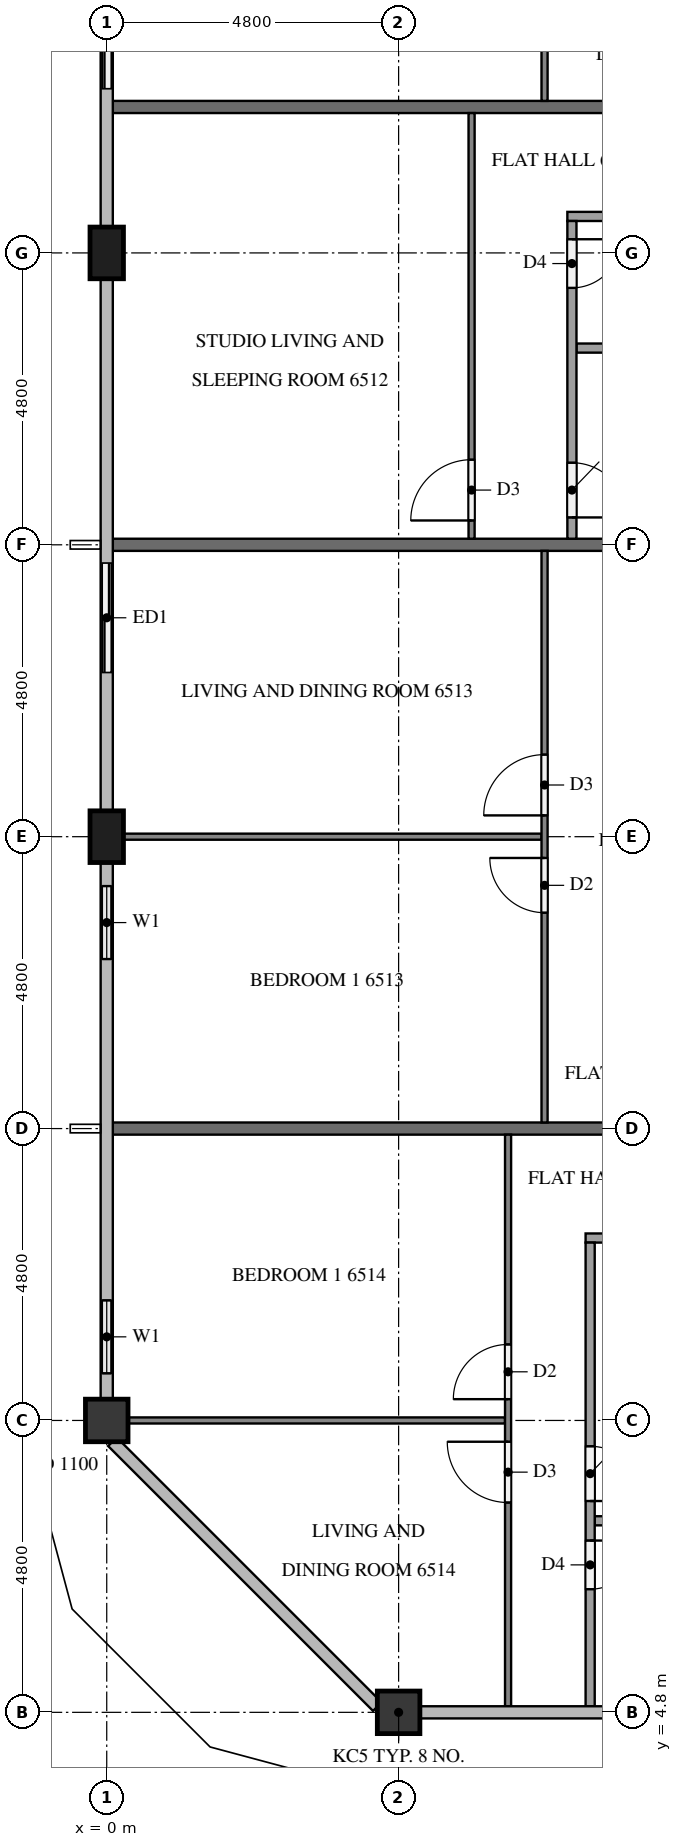
"""IFC4 building model, lengths in metres.
Left out: names, types, materials, properties, quantities, classifications, styles, units other than length and angle.
Written with IfcOpenShell. Run it as: python <this file> out.ifc"""

import sys

from ifc_helpers import new_model, si_unit, direction, frame, frame_2d, origin, origin_2d, place, context, subcontext, project, spatial, rectangle, extrude, element, fill, save


model = new_model("IFC4")
c1 = context("Model", 3, precision=1e-05, world=origin(), true_north=direction((0.0, 1.0)))
c2 = subcontext(c1, "Body", "Model", "MODEL_VIEW")
j1 = project(units=[si_unit("LENGTHUNIT", "METRE"), si_unit("PLANEANGLEUNIT", "RADIAN")], contexts=[c1])
p1 = place(None, origin())
s1 = spatial("IfcSite", under=j1, at=p1, CompositionType="ELEMENT")
p2 = place(p1, origin())
s2 = spatial("IfcBuilding", under=s1, at=p2, CompositionType="ELEMENT")
p3 = place(p2, frame((0.0, 0.0, 249.2)))
s3 = spatial("IfcBuildingStorey", under=s2, at=p3, CompositionType="ELEMENT", Elevation=249.2)
p4 = place(p3, frame((4.8, 4.8, 0.0), z_axis=(0.0, 0.0, 1.0), x_axis=(1.0, 0.0, 0.0)))
e1 = element("IfcColumn", 1, at=p4, inside=s3, PredefinedType="COLUMN", context=c2, shape_type="SweptSolid", body=[
    extrude(rectangle(XDim=0.7, YDim=0.7, at=origin_2d()), origin(), (0.0, 0.0, 1.0), 3.2),
])
for number, where, z_axis, x_axis in (
    (2, (0.0, 28.8, 0.0), (0.0, 0.0, 1.0), (0.0, 1.0, 0.0)),
    (3, (0.0, 19.2, 0.0), (0.0, 0.0, 1.0), (0.0, 1.0, 0.0)),
):
    element("IfcColumn", number, at=place(p3, frame(where, z_axis=z_axis, x_axis=x_axis)), inside=s3, PredefinedType="COLUMN", context=c2, shape_type="SweptSolid", body=[
        extrude(rectangle(XDim=0.85, YDim=0.55, at=origin_2d()), origin(), (0.0, 0.0, 1.0), 3.2),
    ])
p5 = place(p3, frame((0.0, 9.6, 0.0), z_axis=(0.0, 0.0, 1.0), x_axis=(1.0, 0.0, 0.0)))
e4 = element("IfcColumn", 4, at=p5, inside=s3, PredefinedType="COLUMN", context=c2, shape_type="SweptSolid", body=[
    extrude(rectangle(XDim=0.7, YDim=0.7, at=origin_2d()), origin(), (0.0, 0.0, 1.0), 3.2),
])
p6 = place(p3, frame((0.0, 33.6, 0.0), z_axis=(0.0, 0.0, 1.0), x_axis=(0.0, -1.0, 0.0)))
e5 = element("IfcWall", 5, at=p6, inside=s3, PredefinedType="SOLIDWALL", context=c2, shape_type="SweptSolid", body=[
    extrude(rectangle(XDim=2.4, YDim=0.15, at=frame_2d((1.2, 0.0))), origin(), (0.0, 0.0, 1.0), 3.2),
])
p7 = place(p6, frame((0.3, 0.0, 0.0)))
e6 = element("IfcOpeningElement", 6, at=p7, cuts=e5, PredefinedType="OPENING", context=c2, shape_type="SweptSolid", body=[
    extrude(rectangle(XDim=1.8, YDim=2.4, at=frame_2d((0.9, 1.2))), frame((0.0, 0.085, 0.0), z_axis=(0.0, -1.0, 0.0), x_axis=(1.0, 0.0, 0.0)), (0.0, 0.0, 1.0), 0.17),
])
p8 = place(p3, frame((0.0, 24.0, 0.0), z_axis=(0.0, 0.0, 1.0), x_axis=(0.0, -1.0, 0.0)))
e7 = element("IfcWall", 7, at=p8, inside=s3, PredefinedType="SOLIDWALL", context=c2, shape_type="SweptSolid", body=[
    extrude(rectangle(XDim=2.4, YDim=0.15, at=frame_2d((1.2, 0.0))), origin(), (0.0, 0.0, 1.0), 3.2),
])
p9 = place(p8, frame((0.3, 0.0, 0.0)))
e8 = element("IfcOpeningElement", 8, at=p9, cuts=e7, PredefinedType="OPENING", context=c2, shape_type="SweptSolid", body=[
    extrude(rectangle(XDim=1.8, YDim=2.4, at=frame_2d((0.9, 1.2))), frame((0.0, 0.085, 0.0), z_axis=(0.0, -1.0, 0.0), x_axis=(1.0, 0.0, 0.0)), (0.0, 0.0, 1.0), 0.17),
])
p10 = place(p3, frame((0.0, 18.775, 0.0), z_axis=(0.0, 0.0, 1.0), x_axis=(0.0, -1.0, 0.0)))
e9 = element("IfcWall", 9, at=p10, inside=s3, PredefinedType="SOLIDWALL", context=c2, shape_type="SweptSolid", body=[
    extrude(rectangle(XDim=1.975, YDim=0.15, at=frame_2d((0.987, 0.0))), origin(), (0.0, 0.0, 1.0), 3.2),
])
p11 = place(p10, frame((0.387, 0.0, 0.9)))
e10 = element("IfcOpeningElement", 10, at=p11, cuts=e9, PredefinedType="OPENING", context=c2, shape_type="SweptSolid", body=[
    extrude(rectangle(XDim=1.2, YDim=1.4, at=frame_2d((0.6, 0.7))), frame((0.0, 0.085, 0.0), z_axis=(0.0, -1.0, 0.0), x_axis=(1.0, 0.0, 0.0)), (0.0, 0.0, 1.0), 0.17),
])
p12 = place(p3, frame((0.0, 12.0, 0.0), z_axis=(0.0, 0.0, 1.0), x_axis=(0.0, -1.0, 0.0)))
e11 = element("IfcWall", 11, at=p12, inside=s3, PredefinedType="SOLIDWALL", context=c2, shape_type="SweptSolid", body=[
    extrude(rectangle(XDim=2.05, YDim=0.15, at=frame_2d((1.025, 0.0))), origin(), (0.0, 0.0, 1.0), 3.2),
])
p13 = place(p12, frame((0.425, 0.0, 0.9)))
e12 = element("IfcOpeningElement", 12, at=p13, cuts=e11, PredefinedType="OPENING", context=c2, shape_type="SweptSolid", body=[
    extrude(rectangle(XDim=1.2, YDim=1.4, at=frame_2d((0.6, 0.7))), frame((0.0, 0.085, 0.0), z_axis=(0.0, -1.0, 0.0), x_axis=(1.0, 0.0, 0.0)), (0.0, 0.0, 1.0), 0.17),
])
for number, where, z_axis, x_axis in (
    (13, (0.1, 31.2, 0.0), (0.0, 0.0, 1.0), (1.0, 0.0, 0.0)),
    (14, (0.1, 24.0, 0.0), (0.0, 0.0, 1.0), (1.0, 0.0, 0.0)),
    (15, (0.1, 14.4, 0.0), (0.0, 0.0, 1.0), (1.0, 0.0, 0.0)),
):
    element("IfcWall", number, at=place(p3, frame(where, z_axis=z_axis, x_axis=x_axis)), inside=s3, PredefinedType="PARTITIONING", context=c2, shape_type="SweptSolid", body=[
        extrude(rectangle(XDim=11.8, YDim=0.2, at=frame_2d((5.9, 0.0))), origin(), (0.0, 0.0, 1.0), 3.2),
    ])
p14 = place(p3, frame((7.2, 31.3, 0.0), z_axis=(0.0, 0.0, 1.0), x_axis=(0.0, 1.0, 0.0)))
e16 = element("IfcWall", 16, at=p14, inside=s3, PredefinedType="PARTITIONING", context=c2, shape_type="SweptSolid", body=[
    extrude(rectangle(XDim=7.0, YDim=0.1, at=frame_2d((3.5, 0.0))), origin(), (0.0, 0.0, 1.0), 3.2),
])
p15 = place(p14, frame((5.7, 0.0, 0.0)))
e17 = element("IfcOpeningElement", 17, at=p15, cuts=e16, PredefinedType="OPENING", context=c2, shape_type="SweptSolid", body=[
    extrude(rectangle(XDim=1.0, YDim=2.1, at=frame_2d((0.5, 1.05))), frame((0.0, 0.06, 0.0), z_axis=(0.0, -1.0, 0.0), x_axis=(1.0, 0.0, 0.0)), (0.0, 0.0, 1.0), 0.12),
])
p16 = place(p3, frame((6.0, 24.1, 0.0), z_axis=(0.0, 0.0, 1.0), x_axis=(0.0, 1.0, 0.0)))
e18 = element("IfcWall", 18, at=p16, inside=s3, PredefinedType="PARTITIONING", context=c2, shape_type="SweptSolid", body=[
    extrude(rectangle(XDim=7.0, YDim=0.1, at=frame_2d((3.5, 0.0))), origin(), (0.0, 0.0, 1.0), 3.2),
])
p17 = place(p16, frame((0.3, 0.0, 0.0)))
e19 = element("IfcOpeningElement", 19, at=p17, cuts=e18, PredefinedType="OPENING", context=c2, shape_type="SweptSolid", body=[
    extrude(rectangle(XDim=1.0, YDim=2.1, at=frame_2d((0.5, 1.05))), frame((0.0, 0.06, 0.0), z_axis=(0.0, -1.0, 0.0), x_axis=(1.0, 0.0, 0.0)), (0.0, 0.0, 1.0), 0.12),
])
p18 = place(p3, frame((11.9, 27.235, 0.0), z_axis=(0.0, 0.0, 1.0), x_axis=(-1.0, 0.0, 0.0)))
e20 = element("IfcWall", 20, at=p18, inside=s3, PredefinedType="PARTITIONING", context=c2, shape_type="SweptSolid", body=[
    extrude(rectangle(XDim=4.175, YDim=0.15, at=frame_2d((2.087, 0.0))), origin(), (0.0, 0.0, 1.0), 3.2),
])
p19 = place(p3, frame((11.9, 29.4, 0.0), z_axis=(0.0, 0.0, 1.0), x_axis=(-1.0, 0.0, 0.0)))
e21 = element("IfcWall", 21, at=p19, inside=s3, PredefinedType="PARTITIONING", context=c2, shape_type="SweptSolid", body=[
    extrude(rectangle(XDim=4.325, YDim=0.15, at=frame_2d((2.163, 0.0))), origin(), (0.0, 0.0, 1.0), 3.2),
])
p20 = place(p3, frame((7.65, 29.325, 0.0), z_axis=(0.0, 0.0, 1.0), x_axis=(0.0, -1.0, 0.0)))
e22 = element("IfcWall", 22, at=p20, inside=s3, PredefinedType="PARTITIONING", context=c2, shape_type="SweptSolid", body=[
    extrude(rectangle(XDim=5.225, YDim=0.15, at=frame_2d((2.612, 0.0))), origin(), (0.0, 0.0, 1.0), 3.2),
])
p21 = place(p20, frame((0.3, 0.0, 0.0)))
e23 = element("IfcOpeningElement", 23, at=p21, cuts=e22, PredefinedType="OPENING", context=c2, shape_type="SweptSolid", body=[
    extrude(rectangle(XDim=0.8, YDim=2.1, at=frame_2d((0.4, 1.05))), frame((0.0, 0.085, 0.0), z_axis=(0.0, -1.0, 0.0), x_axis=(1.0, 0.0, 0.0)), (0.0, 0.0, 1.0), 0.17),
])
p22 = place(p20, frame((3.975, 0.0, 0.0)))
e24 = element("IfcOpeningElement", 24, at=p22, cuts=e22, PredefinedType="OPENING", context=c2, shape_type="SweptSolid", body=[
    extrude(rectangle(XDim=0.9, YDim=2.1, at=frame_2d((0.45, 1.05))), frame((0.0, 0.085, 0.0), z_axis=(0.0, -1.0, 0.0), x_axis=(1.0, 0.0, 0.0)), (0.0, 0.0, 1.0), 0.17),
])
p23 = place(p3, frame((7.15, 19.2, 0.0), z_axis=(0.0, 0.0, 1.0), x_axis=(-1.0, 0.0, 0.0)))
e25 = element("IfcWall", 25, at=p23, inside=s3, PredefinedType="PARTITIONING", context=c2, shape_type="SweptSolid", body=[
    extrude(rectangle(XDim=6.875, YDim=0.1, at=frame_2d((3.438, 0.0))), origin(), (0.0, 0.0, 1.0), 3.2),
])
p24 = place(p3, frame((7.2, 14.5, 0.0), z_axis=(0.0, 0.0, 1.0), x_axis=(0.0, 1.0, 0.0)))
e26 = element("IfcWall", 26, at=p24, inside=s3, PredefinedType="PARTITIONING", context=c2, shape_type="SweptSolid", body=[
    extrude(rectangle(XDim=9.4, YDim=0.1, at=frame_2d((4.7, 0.0))), origin(), (0.0, 0.0, 1.0), 3.2),
])
p25 = place(p24, frame((3.45, 0.0, 0.0)))
e27 = element("IfcOpeningElement", 27, at=p25, cuts=e26, PredefinedType="OPENING", context=c2, shape_type="SweptSolid", body=[
    extrude(rectangle(XDim=0.9, YDim=2.1, at=frame_2d((0.45, 1.05))), frame((0.0, 0.06, 0.0), z_axis=(0.0, -1.0, 0.0), x_axis=(1.0, 0.0, 0.0)), (0.0, 0.0, 1.0), 0.12),
])
p26 = place(p24, frame((5.05, 0.0, 0.0)))
e28 = element("IfcOpeningElement", 28, at=p26, cuts=e26, PredefinedType="OPENING", context=c2, shape_type="SweptSolid", body=[
    extrude(rectangle(XDim=1.0, YDim=2.1, at=frame_2d((0.5, 1.05))), frame((0.0, 0.06, 0.0), z_axis=(0.0, -1.0, 0.0), x_axis=(1.0, 0.0, 0.0)), (0.0, 0.0, 1.0), 0.12),
])
p27 = place(p3, frame((6.55, 9.6, 0.0), z_axis=(0.0, 0.0, 1.0), x_axis=(-1.0, 0.0, 0.0)))
e29 = element("IfcWall", 29, at=p27, inside=s3, PredefinedType="PARTITIONING", context=c2, shape_type="SweptSolid", body=[
    extrude(rectangle(XDim=6.2, YDim=0.1, at=frame_2d((3.1, 0.0))), origin(), (0.0, 0.0, 1.0), 3.2),
])
p28 = place(p3, frame((6.6, 4.9, 0.0), z_axis=(0.0, 0.0, 1.0), x_axis=(0.0, 1.0, 0.0)))
e30 = element("IfcWall", 30, at=p28, inside=s3, PredefinedType="PARTITIONING", context=c2, shape_type="SweptSolid", body=[
    extrude(rectangle(XDim=9.4, YDim=0.1, at=frame_2d((4.7, 0.0))), origin(), (0.0, 0.0, 1.0), 3.2),
])
p29 = place(p28, frame((5.05, 0.0, 0.0)))
e31 = element("IfcOpeningElement", 31, at=p29, cuts=e30, PredefinedType="OPENING", context=c2, shape_type="SweptSolid", body=[
    extrude(rectangle(XDim=0.9, YDim=2.1, at=frame_2d((0.45, 1.05))), frame((0.0, 0.06, 0.0), z_axis=(0.0, -1.0, 0.0), x_axis=(1.0, 0.0, 0.0)), (0.0, 0.0, 1.0), 0.12),
])
p30 = place(p28, frame((3.35, 0.0, 0.0)))
e32 = element("IfcOpeningElement", 32, at=p30, cuts=e30, PredefinedType="OPENING", context=c2, shape_type="SweptSolid", body=[
    extrude(rectangle(XDim=1.0, YDim=2.1, at=frame_2d((0.5, 1.05))), frame((0.0, 0.06, 0.0), z_axis=(0.0, -1.0, 0.0), x_axis=(1.0, 0.0, 0.0)), (0.0, 0.0, 1.0), 0.12),
])
p31 = place(p3, frame((11.9, 7.95, 0.0), z_axis=(0.0, 0.0, 1.0), x_axis=(-1.0, 0.0, 0.0)))
e33 = element("IfcWall", 33, at=p31, inside=s3, PredefinedType="PARTITIONING", context=c2, shape_type="SweptSolid", body=[
    extrude(rectangle(XDim=3.875, YDim=0.15, at=frame_2d((1.938, 0.0))), origin(), (0.0, 0.0, 1.0), 3.2),
])
p32 = place(p3, frame((11.9, 12.6, 0.0), z_axis=(0.0, 0.0, 1.0), x_axis=(-1.0, 0.0, 0.0)))
e34 = element("IfcWall", 34, at=p32, inside=s3, PredefinedType="PARTITIONING", context=c2, shape_type="SweptSolid", body=[
    extrude(rectangle(XDim=4.025, YDim=0.15, at=frame_2d((2.012, 0.0))), origin(), (0.0, 0.0, 1.0), 3.2),
])
p33 = place(p3, frame((7.95, 12.525, 0.0), z_axis=(0.0, 0.0, 1.0), x_axis=(0.0, -1.0, 0.0)))
e35 = element("IfcWall", 35, at=p33, inside=s3, PredefinedType="PARTITIONING", context=c2, shape_type="SweptSolid", body=[
    extrude(rectangle(XDim=7.625, YDim=0.15, at=frame_2d((3.812, 0.0))), origin(), (0.0, 0.0, 1.0), 3.2),
])
p34 = place(p33, frame((3.35, 0.0, 0.0)))
e36 = element("IfcOpeningElement", 36, at=p34, cuts=e35, PredefinedType="OPENING", context=c2, shape_type="SweptSolid", body=[
    extrude(rectangle(XDim=0.9, YDim=2.1, at=frame_2d((0.45, 1.05))), frame((0.0, 0.085, 0.0), z_axis=(0.0, -1.0, 0.0), x_axis=(1.0, 0.0, 0.0)), (0.0, 0.0, 1.0), 0.17),
])
p35 = place(p33, frame((4.9, 0.0, 0.0)))
e37 = element("IfcOpeningElement", 37, at=p35, cuts=e35, PredefinedType="OPENING", context=c2, shape_type="SweptSolid", body=[
    extrude(rectangle(XDim=0.8, YDim=2.1, at=frame_2d((0.4, 1.05))), frame((0.0, 0.085, 0.0), z_axis=(0.0, -1.0, 0.0), x_axis=(1.0, 0.0, 0.0)), (0.0, 0.0, 1.0), 0.17),
])
p36 = place(p7, origin())
e38 = element("IfcDoor", 38, at=p36, inside=s3, OperationType="SLIDING_TO_RIGHT", PredefinedType="DOOR", context=c2, shape_type="SweptSolid", body=[
    extrude(rectangle(XDim=1.8, YDim=2.4, at=frame_2d((0.9, 1.2))), frame((0.0, 0.025, 0.0), z_axis=(0.0, -1.0, 0.0), x_axis=(1.0, 0.0, 0.0)), (0.0, 0.0, 1.0), 0.05),
])
fill(e6, e38)
p37 = place(p9, origin())
e39 = element("IfcDoor", 39, at=p37, inside=s3, OperationType="SLIDING_TO_LEFT", PredefinedType="DOOR", context=c2, shape_type="SweptSolid", body=[
    extrude(rectangle(XDim=1.8, YDim=2.4, at=frame_2d((0.9, 1.2))), frame((0.0, 0.025, 0.0), z_axis=(0.0, -1.0, 0.0), x_axis=(1.0, 0.0, 0.0)), (0.0, 0.0, 1.0), 0.05),
])
fill(e8, e39)
p38 = place(p11, origin())
e40 = element("IfcWindow", 40, at=p38, inside=s3, PartitioningType="SINGLE_PANEL", PredefinedType="WINDOW", context=c2, shape_type="SweptSolid", body=[
    extrude(rectangle(XDim=1.2, YDim=1.4, at=frame_2d((0.6, 0.7))), frame((0.0, 0.03, 0.0), z_axis=(0.0, -1.0, 0.0), x_axis=(1.0, 0.0, 0.0)), (0.0, 0.0, 1.0), 0.06),
])
fill(e10, e40)
p39 = place(p13, origin())
e41 = element("IfcWindow", 41, at=p39, inside=s3, PartitioningType="SINGLE_PANEL", PredefinedType="WINDOW", context=c2, shape_type="SweptSolid", body=[
    extrude(rectangle(XDim=1.2, YDim=1.4, at=frame_2d((0.6, 0.7))), frame((0.0, 0.03, 0.0), z_axis=(0.0, -1.0, 0.0), x_axis=(1.0, 0.0, 0.0)), (0.0, 0.0, 1.0), 0.06),
])
fill(e12, e41)
p40 = place(p17, origin())
e42 = element("IfcDoor", 42, at=p40, inside=s3, OperationType="SINGLE_SWING_LEFT", PredefinedType="DOOR", context=c2, shape_type="SweptSolid", body=[
    extrude(rectangle(XDim=1.0, YDim=2.1, at=frame_2d((0.5, 1.05))), frame((0.0, 0.025, 0.0), z_axis=(0.0, -1.0, 0.0), x_axis=(1.0, 0.0, 0.0)), (0.0, 0.0, 1.0), 0.05),
])
fill(e19, e42)
p41 = place(p21, origin())
e43 = element("IfcDoor", 43, at=p41, inside=s3, OperationType="SINGLE_SWING_LEFT", PredefinedType="DOOR", context=c2, shape_type="SweptSolid", body=[
    extrude(rectangle(XDim=0.8, YDim=2.1, at=frame_2d((0.4, 1.05))), frame((0.0, 0.025, 0.0), z_axis=(0.0, -1.0, 0.0), x_axis=(1.0, 0.0, 0.0)), (0.0, 0.0, 1.0), 0.05),
])
fill(e23, e43)
p42 = place(p22, origin())
e44 = element("IfcDoor", 44, at=p42, inside=s3, OperationType="SINGLE_SWING_RIGHT", PredefinedType="DOOR", context=c2, shape_type="SweptSolid", body=[
    extrude(rectangle(XDim=0.9, YDim=2.1, at=frame_2d((0.45, 1.05))), frame((0.0, 0.025, 0.0), z_axis=(0.0, -1.0, 0.0), x_axis=(1.0, 0.0, 0.0)), (0.0, 0.0, 1.0), 0.05),
])
fill(e24, e44)
p43 = place(p25, origin())
e45 = element("IfcDoor", 45, at=p43, inside=s3, OperationType="SINGLE_SWING_RIGHT", PredefinedType="DOOR", context=c2, shape_type="SweptSolid", body=[
    extrude(rectangle(XDim=0.9, YDim=2.1, at=frame_2d((0.45, 1.05))), frame((0.0, 0.025, 0.0), z_axis=(0.0, -1.0, 0.0), x_axis=(1.0, 0.0, 0.0)), (0.0, 0.0, 1.0), 0.05),
])
fill(e27, e45)
p44 = place(p26, origin())
e46 = element("IfcDoor", 46, at=p44, inside=s3, OperationType="SINGLE_SWING_LEFT", PredefinedType="DOOR", context=c2, shape_type="SweptSolid", body=[
    extrude(rectangle(XDim=1.0, YDim=2.1, at=frame_2d((0.5, 1.05))), frame((0.0, 0.025, 0.0), z_axis=(0.0, -1.0, 0.0), x_axis=(1.0, 0.0, 0.0)), (0.0, 0.0, 1.0), 0.05),
])
fill(e28, e46)
p45 = place(p29, origin())
e47 = element("IfcDoor", 47, at=p45, inside=s3, OperationType="SINGLE_SWING_LEFT", PredefinedType="DOOR", context=c2, shape_type="SweptSolid", body=[
    extrude(rectangle(XDim=0.9, YDim=2.1, at=frame_2d((0.45, 1.05))), frame((0.0, 0.025, 0.0), z_axis=(0.0, -1.0, 0.0), x_axis=(1.0, 0.0, 0.0)), (0.0, 0.0, 1.0), 0.05),
])
fill(e31, e47)
p46 = place(p30, origin())
e48 = element("IfcDoor", 48, at=p46, inside=s3, OperationType="SINGLE_SWING_RIGHT", PredefinedType="DOOR", context=c2, shape_type="SweptSolid", body=[
    extrude(rectangle(XDim=1.0, YDim=2.1, at=frame_2d((0.5, 1.05))), frame((0.0, 0.025, 0.0), z_axis=(0.0, -1.0, 0.0), x_axis=(1.0, 0.0, 0.0)), (0.0, 0.0, 1.0), 0.05),
])
fill(e32, e48)
p47 = place(p34, origin())
e49 = element("IfcDoor", 49, at=p47, inside=s3, OperationType="SINGLE_SWING_RIGHT", PredefinedType="DOOR", context=c2, shape_type="SweptSolid", body=[
    extrude(rectangle(XDim=0.9, YDim=2.1, at=frame_2d((0.45, 1.05))), frame((0.0, 0.025, 0.0), z_axis=(0.0, -1.0, 0.0), x_axis=(1.0, 0.0, 0.0)), (0.0, 0.0, 1.0), 0.05),
])
fill(e36, e49)
p48 = place(p35, origin())
e50 = element("IfcDoor", 50, at=p48, inside=s3, OperationType="SINGLE_SWING_LEFT", PredefinedType="DOOR", context=c2, shape_type="SweptSolid", body=[
    extrude(rectangle(XDim=0.8, YDim=2.1, at=frame_2d((0.4, 1.05))), frame((0.0, 0.025, 0.0), z_axis=(0.0, -1.0, 0.0), x_axis=(1.0, 0.0, 0.0)), (0.0, 0.0, 1.0), 0.05),
])
fill(e37, e50)
save(model, sys.argv[1])
